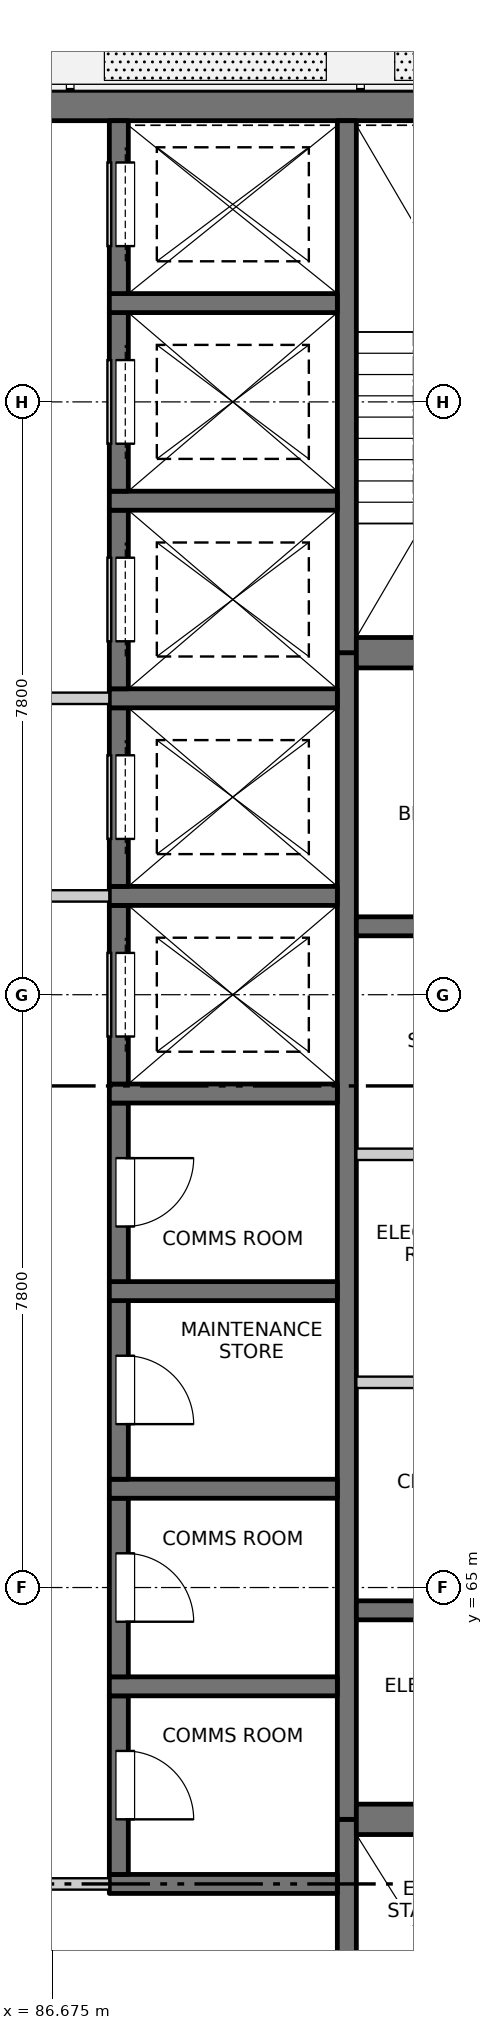
"""IFC4 building model, lengths in metres.
Left out: names, types, materials, properties, quantities, classifications, styles, units other than length and angle.
Written with IfcOpenShell. Run it as: python <this file> out.ifc"""

import sys

from ifc_helpers import new_model, si_unit, direction, frame, frame_2d, origin, place, context, subcontext, project, spatial, rectangle, extrude, element, fill, save


model = new_model("IFC4")
c1 = context("Model", 3, precision=1e-05, world=origin(), true_north=direction((0.0, 1.0)))
c2 = subcontext(c1, "Body", "Model", "MODEL_VIEW")
j1 = project(units=[si_unit("LENGTHUNIT", "METRE"), si_unit("PLANEANGLEUNIT", "RADIAN")], contexts=[c1])
p1 = place(None, origin())
s1 = spatial("IfcSite", under=j1, at=p1, CompositionType="ELEMENT")
p2 = place(p1, origin())
s2 = spatial("IfcBuilding", under=s1, at=p2, CompositionType="ELEMENT")
p3 = place(p2, frame((0.0, 0.0, 246.0)))
s3 = spatial("IfcBuildingStorey", under=s2, at=p3, CompositionType="ELEMENT", Elevation=246.0)
p4 = place(p3, frame((75.45, 84.5, -0.3), z_axis=(0.0, 0.0, 1.0), x_axis=(1.0, 0.0, 0.0)))
e1 = element("IfcWall", 1, at=p4, inside=s3, PredefinedType="SOLIDWALL", context=c2, shape_type="SweptSolid", body=[
    extrude(rectangle(XDim=19.1, YDim=0.4, at=frame_2d((9.55, 0.0))), origin(), (0.0, 0.0, 1.0), 3.45),
])
p5 = place(p3, frame((90.55, 55.45, -0.3), z_axis=(0.0, 0.0, 1.0), x_axis=(0.0, 1.0, 0.0)))
e2 = element("IfcWall", 2, at=p5, inside=s3, PredefinedType="SOLIDWALL", context=c2, shape_type="SweptSolid", body=[
    extrude(rectangle(XDim=6.5, YDim=0.25, at=frame_2d((3.25, 0.0))), origin(), (0.0, 0.0, 1.0), 3.45),
])
p6 = place(p3, frame((90.55, 61.95, -0.3), z_axis=(0.0, 0.0, 1.0), x_axis=(0.0, 1.0, 0.0)))
e3 = element("IfcWall", 3, at=p6, inside=s3, PredefinedType="SOLIDWALL", context=c2, shape_type="SweptSolid", body=[
    extrude(rectangle(XDim=15.35, YDim=0.25, at=frame_2d((7.675, 0.0))), origin(), (0.0, 0.0, 1.0), 3.45),
])
p7 = place(p3, frame((90.55, 77.3, -0.3), z_axis=(0.0, 0.0, 1.0), x_axis=(0.0, 1.0, 0.0)))
e4 = element("IfcWall", 4, at=p7, inside=s3, PredefinedType="SOLIDWALL", context=c2, shape_type="SweptSolid", body=[
    extrude(rectangle(XDim=7.0, YDim=0.25, at=frame_2d((3.5, 0.0))), origin(), (0.0, 0.0, 1.0), 3.45),
])
p8 = place(p3, frame((87.425, 61.1, -0.3), z_axis=(0.0, 0.0, 1.0), x_axis=(1.0, 0.0, 0.0)))
e5 = element("IfcWall", 5, at=p8, inside=s3, PredefinedType="SOLIDWALL", context=c2, shape_type="SweptSolid", body=[
    extrude(rectangle(XDim=3.0, YDim=0.25, at=frame_2d((1.5, 0.0))), origin(), (0.0, 0.0, 1.0), 3.45),
])
p9 = place(p3, frame((87.55, 61.225, -0.3), z_axis=(0.0, 0.0, 1.0), x_axis=(0.0, 1.0, 0.0)))
e6 = element("IfcWall", 6, at=p9, inside=s3, PredefinedType="SOLIDWALL", context=c2, shape_type="SweptSolid", body=[
    extrude(rectangle(XDim=2.35, YDim=0.25, at=frame_2d((1.175, 0.0))), origin(), (0.0, 0.0, 1.0), 3.45),
])
p10 = place(p9, frame((0.725, 0.0, 0.3)))
e7 = element("IfcOpeningElement", 7, at=p10, cuts=e6, PredefinedType="OPENING", context=c2, shape_type="SweptSolid", body=[
    extrude(rectangle(XDim=0.9, YDim=2.1, at=frame_2d((0.45, 1.05))), frame((0.0, 0.135, 0.0), z_axis=(0.0, -1.0, 0.0), x_axis=(1.0, 0.0, 0.0)), (0.0, 0.0, 1.0), 0.27),
])
p11 = place(p3, frame((87.425, 63.7, -0.3), z_axis=(0.0, 0.0, 1.0), x_axis=(1.0, 0.0, 0.0)))
e8 = element("IfcWall", 8, at=p11, inside=s3, PredefinedType="SOLIDWALL", context=c2, shape_type="SweptSolid", body=[
    extrude(rectangle(XDim=3.0, YDim=0.25, at=frame_2d((1.5, 0.0))), origin(), (0.0, 0.0, 1.0), 3.45),
])
p12 = place(p3, frame((87.55, 63.825, -0.3), z_axis=(0.0, 0.0, 1.0), x_axis=(0.0, 1.0, 0.0)))
e9 = element("IfcWall", 9, at=p12, inside=s3, PredefinedType="SOLIDWALL", context=c2, shape_type="SweptSolid", body=[
    extrude(rectangle(XDim=2.35, YDim=0.25, at=frame_2d((1.175, 0.0))), origin(), (0.0, 0.0, 1.0), 3.45),
])
p13 = place(p12, frame((0.725, 0.0, 0.3)))
e10 = element("IfcOpeningElement", 10, at=p13, cuts=e9, PredefinedType="OPENING", context=c2, shape_type="SweptSolid", body=[
    extrude(rectangle(XDim=0.9, YDim=2.1, at=frame_2d((0.45, 1.05))), frame((0.0, 0.135, 0.0), z_axis=(0.0, -1.0, 0.0), x_axis=(1.0, 0.0, 0.0)), (0.0, 0.0, 1.0), 0.27),
])
p14 = place(p3, frame((87.425, 66.3, -0.3), z_axis=(0.0, 0.0, 1.0), x_axis=(1.0, 0.0, 0.0)))
e11 = element("IfcWall", 11, at=p14, inside=s3, PredefinedType="SOLIDWALL", context=c2, shape_type="SweptSolid", body=[
    extrude(rectangle(XDim=3.0, YDim=0.25, at=frame_2d((1.5, 0.0))), origin(), (0.0, 0.0, 1.0), 3.45),
])
p15 = place(p3, frame((87.55, 66.425, -0.3), z_axis=(0.0, 0.0, 1.0), x_axis=(0.0, 1.0, 0.0)))
e12 = element("IfcWall", 12, at=p15, inside=s3, PredefinedType="SOLIDWALL", context=c2, shape_type="SweptSolid", body=[
    extrude(rectangle(XDim=2.35, YDim=0.25, at=frame_2d((1.175, 0.0))), origin(), (0.0, 0.0, 1.0), 3.45),
])
p16 = place(p15, frame((0.725, 0.0, 0.3)))
e13 = element("IfcOpeningElement", 13, at=p16, cuts=e12, PredefinedType="OPENING", context=c2, shape_type="SweptSolid", body=[
    extrude(rectangle(XDim=0.9, YDim=2.1, at=frame_2d((0.45, 1.05))), frame((0.0, 0.135, 0.0), z_axis=(0.0, -1.0, 0.0), x_axis=(1.0, 0.0, 0.0)), (0.0, 0.0, 1.0), 0.27),
])
p17 = place(p3, frame((87.425, 68.9, -0.3), z_axis=(0.0, 0.0, 1.0), x_axis=(1.0, 0.0, 0.0)))
e14 = element("IfcWall", 14, at=p17, inside=s3, PredefinedType="SOLIDWALL", context=c2, shape_type="SweptSolid", body=[
    extrude(rectangle(XDim=3.0, YDim=0.25, at=frame_2d((1.5, 0.0))), origin(), (0.0, 0.0, 1.0), 3.45),
])
p18 = place(p3, frame((87.55, 69.025, -0.3), z_axis=(0.0, 0.0, 1.0), x_axis=(0.0, 1.0, 0.0)))
e15 = element("IfcWall", 15, at=p18, inside=s3, PredefinedType="SOLIDWALL", context=c2, shape_type="SweptSolid", body=[
    extrude(rectangle(XDim=2.35, YDim=0.25, at=frame_2d((1.175, 0.0))), origin(), (0.0, 0.0, 1.0), 3.45),
])
p19 = place(p18, frame((0.725, 0.0, 0.3)))
e16 = element("IfcOpeningElement", 16, at=p19, cuts=e15, PredefinedType="OPENING", context=c2, shape_type="SweptSolid", body=[
    extrude(rectangle(XDim=0.9, YDim=2.1, at=frame_2d((0.45, 1.05))), frame((0.0, 0.135, 0.0), z_axis=(0.0, -1.0, 0.0), x_axis=(1.0, 0.0, 0.0)), (0.0, 0.0, 1.0), 0.27),
])
p20 = place(p3, frame((87.425, 71.5, -0.3), z_axis=(0.0, 0.0, 1.0), x_axis=(1.0, 0.0, 0.0)))
e17 = element("IfcWall", 17, at=p20, inside=s3, PredefinedType="SOLIDWALL", context=c2, shape_type="SweptSolid", body=[
    extrude(rectangle(XDim=3.0, YDim=0.25, at=frame_2d((1.5, 0.0))), origin(), (0.0, 0.0, 1.0), 3.45),
])
p21 = place(p3, frame((87.55, 71.625, -0.3), z_axis=(0.0, 0.0, 1.0), x_axis=(0.0, 1.0, 0.0)))
e18 = element("IfcWall", 18, at=p21, inside=s3, PredefinedType="SOLIDWALL", context=c2, shape_type="SweptSolid", body=[
    extrude(rectangle(XDim=2.35, YDim=0.25, at=frame_2d((1.175, 0.0))), origin(), (0.0, 0.0, 1.0), 3.45),
])
p22 = place(p21, frame((0.625, 0.0, 0.3)))
e19 = element("IfcOpeningElement", 19, at=p22, cuts=e18, PredefinedType="OPENING", context=c2, shape_type="SweptSolid", body=[
    extrude(rectangle(XDim=1.1, YDim=2.1, at=frame_2d((0.55, 1.05))), frame((0.0, 0.135, 0.0), z_axis=(0.0, -1.0, 0.0), x_axis=(1.0, 0.0, 0.0)), (0.0, 0.0, 1.0), 0.27),
])
p23 = place(p3, frame((87.425, 74.1, -0.3), z_axis=(0.0, 0.0, 1.0), x_axis=(1.0, 0.0, 0.0)))
e20 = element("IfcWall", 20, at=p23, inside=s3, PredefinedType="SOLIDWALL", context=c2, shape_type="SweptSolid", body=[
    extrude(rectangle(XDim=3.0, YDim=0.25, at=frame_2d((1.5, 0.0))), origin(), (0.0, 0.0, 1.0), 3.45),
])
p24 = place(p3, frame((87.55, 74.225, -0.3), z_axis=(0.0, 0.0, 1.0), x_axis=(0.0, 1.0, 0.0)))
e21 = element("IfcWall", 21, at=p24, inside=s3, PredefinedType="SOLIDWALL", context=c2, shape_type="SweptSolid", body=[
    extrude(rectangle(XDim=2.35, YDim=0.25, at=frame_2d((1.175, 0.0))), origin(), (0.0, 0.0, 1.0), 3.45),
])
p25 = place(p24, frame((0.625, 0.0, 0.3)))
e22 = element("IfcOpeningElement", 22, at=p25, cuts=e21, PredefinedType="OPENING", context=c2, shape_type="SweptSolid", body=[
    extrude(rectangle(XDim=1.1, YDim=2.1, at=frame_2d((0.55, 1.05))), frame((0.0, 0.135, 0.0), z_axis=(0.0, -1.0, 0.0), x_axis=(1.0, 0.0, 0.0)), (0.0, 0.0, 1.0), 0.27),
])
p26 = place(p3, frame((87.425, 76.7, -0.3), z_axis=(0.0, 0.0, 1.0), x_axis=(1.0, 0.0, 0.0)))
e23 = element("IfcWall", 23, at=p26, inside=s3, PredefinedType="SOLIDWALL", context=c2, shape_type="SweptSolid", body=[
    extrude(rectangle(XDim=3.0, YDim=0.25, at=frame_2d((1.5, 0.0))), origin(), (0.0, 0.0, 1.0), 3.45),
])
p27 = place(p3, frame((87.55, 76.825, -0.3), z_axis=(0.0, 0.0, 1.0), x_axis=(0.0, 1.0, 0.0)))
e24 = element("IfcWall", 24, at=p27, inside=s3, PredefinedType="SOLIDWALL", context=c2, shape_type="SweptSolid", body=[
    extrude(rectangle(XDim=2.35, YDim=0.25, at=frame_2d((1.175, 0.0))), origin(), (0.0, 0.0, 1.0), 3.45),
])
p28 = place(p27, frame((0.625, 0.0, 0.3)))
e25 = element("IfcOpeningElement", 25, at=p28, cuts=e24, PredefinedType="OPENING", context=c2, shape_type="SweptSolid", body=[
    extrude(rectangle(XDim=1.1, YDim=2.1, at=frame_2d((0.55, 1.05))), frame((0.0, 0.135, 0.0), z_axis=(0.0, -1.0, 0.0), x_axis=(1.0, 0.0, 0.0)), (0.0, 0.0, 1.0), 0.27),
])
p29 = place(p3, frame((87.425, 79.3, -0.3), z_axis=(0.0, 0.0, 1.0), x_axis=(1.0, 0.0, 0.0)))
e26 = element("IfcWall", 26, at=p29, inside=s3, PredefinedType="SOLIDWALL", context=c2, shape_type="SweptSolid", body=[
    extrude(rectangle(XDim=3.0, YDim=0.25, at=frame_2d((1.5, 0.0))), origin(), (0.0, 0.0, 1.0), 3.45),
])
p30 = place(p3, frame((87.55, 79.425, -0.3), z_axis=(0.0, 0.0, 1.0), x_axis=(0.0, 1.0, 0.0)))
e27 = element("IfcWall", 27, at=p30, inside=s3, PredefinedType="SOLIDWALL", context=c2, shape_type="SweptSolid", body=[
    extrude(rectangle(XDim=2.35, YDim=0.25, at=frame_2d((1.175, 0.0))), origin(), (0.0, 0.0, 1.0), 3.45),
])
p31 = place(p30, frame((0.625, 0.0, 0.3)))
e28 = element("IfcOpeningElement", 28, at=p31, cuts=e27, PredefinedType="OPENING", context=c2, shape_type="SweptSolid", body=[
    extrude(rectangle(XDim=1.1, YDim=2.1, at=frame_2d((0.55, 1.05))), frame((0.0, 0.135, 0.0), z_axis=(0.0, -1.0, 0.0), x_axis=(1.0, 0.0, 0.0)), (0.0, 0.0, 1.0), 0.27),
])
p32 = place(p3, frame((87.425, 81.9, -0.3), z_axis=(0.0, 0.0, 1.0), x_axis=(1.0, 0.0, 0.0)))
e29 = element("IfcWall", 29, at=p32, inside=s3, PredefinedType="SOLIDWALL", context=c2, shape_type="SweptSolid", body=[
    extrude(rectangle(XDim=3.0, YDim=0.25, at=frame_2d((1.5, 0.0))), origin(), (0.0, 0.0, 1.0), 3.45),
])
p33 = place(p3, frame((87.55, 82.025, -0.3), z_axis=(0.0, 0.0, 1.0), x_axis=(0.0, 1.0, 0.0)))
e30 = element("IfcWall", 30, at=p33, inside=s3, PredefinedType="SOLIDWALL", context=c2, shape_type="SweptSolid", body=[
    extrude(rectangle(XDim=2.275, YDim=0.25, at=frame_2d((1.138, 0.0))), origin(), (0.0, 0.0, 1.0), 3.45),
])
p34 = place(p33, frame((0.625, 0.0, 0.3)))
e31 = element("IfcOpeningElement", 31, at=p34, cuts=e30, PredefinedType="OPENING", context=c2, shape_type="SweptSolid", body=[
    extrude(rectangle(XDim=1.1, YDim=2.1, at=frame_2d((0.55, 1.05))), frame((0.0, 0.135, 0.0), z_axis=(0.0, -1.0, 0.0), x_axis=(1.0, 0.0, 0.0)), (0.0, 0.0, 1.0), 0.27),
])
p35 = place(p3, frame((90.675, 61.95, -0.3), z_axis=(0.0, 0.0, 1.0), x_axis=(1.0, 0.0, 0.0)))
e32 = element("IfcWall", 32, at=p35, inside=s3, PredefinedType="SOLIDWALL", context=c2, shape_type="SweptSolid", body=[
    extrude(rectangle(XDim=3.875, YDim=0.4, at=frame_2d((1.938, 0.0))), origin(), (0.0, 0.0, 1.0), 3.45),
])
for number, where, z_axis, x_axis in (
    (33, (90.675, 64.7, -0.3), (0.0, 0.0, 1.0), (1.0, 0.0, 0.0)),
    (34, (90.675, 73.7, -0.3), (0.0, 0.0, 1.0), (1.0, 0.0, 0.0)),
):
    element("IfcWall", number, at=place(p3, frame(where, z_axis=z_axis, x_axis=x_axis)), inside=s3, PredefinedType="SOLIDWALL", context=c2, shape_type="SweptSolid", body=[
        extrude(rectangle(XDim=3.875, YDim=0.25, at=frame_2d((1.938, 0.0))), origin(), (0.0, 0.0, 1.0), 3.45),
    ])
p36 = place(p3, frame((90.675, 77.3, -0.3), z_axis=(0.0, 0.0, 1.0), x_axis=(1.0, 0.0, 0.0)))
e35 = element("IfcWall", 35, at=p36, inside=s3, PredefinedType="SOLIDWALL", context=c2, shape_type="SweptSolid", body=[
    extrude(rectangle(XDim=3.875, YDim=0.4, at=frame_2d((1.938, 0.0))), origin(), (0.0, 0.0, 1.0), 3.45),
])
p37 = place(p3, frame((82.575, 61.1, 0.0), z_axis=(0.0, 0.0, 1.0), x_axis=(1.0, 0.0, 0.0)))
e36 = element("IfcWall", 36, at=p37, inside=s3, PredefinedType="PARTITIONING", context=c2, shape_type="SweptSolid", body=[
    extrude(rectangle(XDim=4.85, YDim=0.15, at=frame_2d((2.425, 0.0))), origin(), (0.0, 0.0, 1.0), 3.15),
])
p38 = place(p37, frame((1.525, 0.0, 0.0)))
e37 = element("IfcOpeningElement", 37, at=p38, cuts=e36, PredefinedType="OPENING", context=c2, shape_type="SweptSolid", body=[
    extrude(rectangle(XDim=1.8, YDim=2.1, at=frame_2d((0.9, 1.05))), frame((0.0, 0.085, 0.0), z_axis=(0.0, -1.0, 0.0), x_axis=(1.0, 0.0, 0.0)), (0.0, 0.0, 1.0), 0.17),
])
for number, where, z_axis, x_axis in (
    (38, (90.675, 67.7, 0.0), (0.0, 0.0, 1.0), (1.0, 0.0, 0.0)),
    (39, (90.675, 70.7, 0.0), (0.0, 0.0, 1.0), (1.0, 0.0, 0.0)),
):
    element("IfcWall", number, at=place(p3, frame(where, z_axis=z_axis, x_axis=x_axis)), inside=s3, PredefinedType="PARTITIONING", context=c2, shape_type="SweptSolid", body=[
        extrude(rectangle(XDim=3.875, YDim=0.15, at=frame_2d((1.938, 0.0))), origin(), (0.0, 0.0, 1.0), 3.15),
    ])
p39 = place(p3, frame((82.575, 74.1, 0.0), z_axis=(0.0, 0.0, 1.0), x_axis=(1.0, 0.0, 0.0)))
e40 = element("IfcWall", 40, at=p39, inside=s3, PredefinedType="PARTITIONING", context=c2, shape_type="SweptSolid", body=[
    extrude(rectangle(XDim=4.85, YDim=0.15, at=frame_2d((2.425, 0.0))), origin(), (0.0, 0.0, 1.0), 3.15),
])
p40 = place(p39, frame((1.525, 0.0, 0.0)))
e41 = element("IfcOpeningElement", 41, at=p40, cuts=e40, PredefinedType="OPENING", context=c2, shape_type="SweptSolid", body=[
    extrude(rectangle(XDim=1.8, YDim=2.1, at=frame_2d((0.9, 1.05))), frame((0.0, 0.085, 0.0), z_axis=(0.0, -1.0, 0.0), x_axis=(1.0, 0.0, 0.0)), (0.0, 0.0, 1.0), 0.17),
])
p41 = place(p3, frame((82.575, 76.7, 0.0), z_axis=(0.0, 0.0, 1.0), x_axis=(1.0, 0.0, 0.0)))
e42 = element("IfcWall", 42, at=p41, inside=s3, PredefinedType="PARTITIONING", context=c2, shape_type="SweptSolid", body=[
    extrude(rectangle(XDim=4.85, YDim=0.15, at=frame_2d((2.425, 0.0))), origin(), (0.0, 0.0, 1.0), 3.15),
])
p42 = place(p41, frame((1.525, 0.0, 0.0)))
e43 = element("IfcOpeningElement", 43, at=p42, cuts=e42, PredefinedType="OPENING", context=c2, shape_type="SweptSolid", body=[
    extrude(rectangle(XDim=1.8, YDim=2.1, at=frame_2d((0.9, 1.05))), frame((0.0, 0.085, 0.0), z_axis=(0.0, -1.0, 0.0), x_axis=(1.0, 0.0, 0.0)), (0.0, 0.0, 1.0), 0.17),
])
p43 = place(p10, origin())
e44 = element("IfcDoor", 44, at=p43, inside=s3, OperationType="SINGLE_SWING_RIGHT", PredefinedType="DOOR", context=c2, shape_type="SweptSolid", body=[
    extrude(rectangle(XDim=0.9, YDim=2.1, at=frame_2d((0.45, 1.05))), frame((0.0, -0.06, 0.0), z_axis=(0.0, -1.0, 0.0), x_axis=(1.0, 0.0, 0.0)), (0.0, 0.0, 1.0), 0.05),
])
fill(e7, e44)
p44 = place(p13, origin())
e45 = element("IfcDoor", 45, at=p44, inside=s3, OperationType="SINGLE_SWING_RIGHT", PredefinedType="DOOR", context=c2, shape_type="SweptSolid", body=[
    extrude(rectangle(XDim=0.9, YDim=2.1, at=frame_2d((0.45, 1.05))), frame((0.0, -0.06, 0.0), z_axis=(0.0, -1.0, 0.0), x_axis=(1.0, 0.0, 0.0)), (0.0, 0.0, 1.0), 0.05),
])
fill(e10, e45)
p45 = place(p16, origin())
e46 = element("IfcDoor", 46, at=p45, inside=s3, OperationType="SINGLE_SWING_RIGHT", PredefinedType="DOOR", context=c2, shape_type="SweptSolid", body=[
    extrude(rectangle(XDim=0.9, YDim=2.1, at=frame_2d((0.45, 1.05))), frame((0.0, -0.06, 0.0), z_axis=(0.0, -1.0, 0.0), x_axis=(1.0, 0.0, 0.0)), (0.0, 0.0, 1.0), 0.05),
])
fill(e13, e46)
p46 = place(p19, origin())
e47 = element("IfcDoor", 47, at=p46, inside=s3, OperationType="SINGLE_SWING_LEFT", PredefinedType="DOOR", context=c2, shape_type="SweptSolid", body=[
    extrude(rectangle(XDim=0.9, YDim=2.1, at=frame_2d((0.45, 1.05))), frame((0.0, -0.06, 0.0), z_axis=(0.0, -1.0, 0.0), x_axis=(1.0, 0.0, 0.0)), (0.0, 0.0, 1.0), 0.05),
])
fill(e16, e47)
p47 = place(p22, origin())
e48 = element("IfcDoor", 48, at=p47, inside=s3, OperationType="SLIDING_TO_LEFT", PredefinedType="DOOR", context=c2, shape_type="SweptSolid", body=[
    extrude(rectangle(XDim=1.1, YDim=2.1, at=frame_2d((0.55, 1.05))), frame((0.0, -0.06, 0.0), z_axis=(0.0, -1.0, 0.0), x_axis=(1.0, 0.0, 0.0)), (0.0, 0.0, 1.0), 0.05),
])
fill(e19, e48)
p48 = place(p25, origin())
e49 = element("IfcDoor", 49, at=p48, inside=s3, OperationType="SLIDING_TO_LEFT", PredefinedType="DOOR", context=c2, shape_type="SweptSolid", body=[
    extrude(rectangle(XDim=1.1, YDim=2.1, at=frame_2d((0.55, 1.05))), frame((0.0, -0.06, 0.0), z_axis=(0.0, -1.0, 0.0), x_axis=(1.0, 0.0, 0.0)), (0.0, 0.0, 1.0), 0.05),
])
fill(e22, e49)
p49 = place(p28, origin())
e50 = element("IfcDoor", 50, at=p49, inside=s3, OperationType="SLIDING_TO_LEFT", PredefinedType="DOOR", context=c2, shape_type="SweptSolid", body=[
    extrude(rectangle(XDim=1.1, YDim=2.1, at=frame_2d((0.55, 1.05))), frame((0.0, -0.06, 0.0), z_axis=(0.0, -1.0, 0.0), x_axis=(1.0, 0.0, 0.0)), (0.0, 0.0, 1.0), 0.05),
])
fill(e25, e50)
p50 = place(p31, origin())
e51 = element("IfcDoor", 51, at=p50, inside=s3, OperationType="SLIDING_TO_RIGHT", PredefinedType="DOOR", context=c2, shape_type="SweptSolid", body=[
    extrude(rectangle(XDim=1.1, YDim=2.1, at=frame_2d((0.55, 1.05))), frame((0.0, -0.06, 0.0), z_axis=(0.0, -1.0, 0.0), x_axis=(1.0, 0.0, 0.0)), (0.0, 0.0, 1.0), 0.05),
])
fill(e28, e51)
p51 = place(p34, origin())
e52 = element("IfcDoor", 52, at=p51, inside=s3, OperationType="SLIDING_TO_RIGHT", PredefinedType="DOOR", context=c2, shape_type="SweptSolid", body=[
    extrude(rectangle(XDim=1.1, YDim=2.1, at=frame_2d((0.55, 1.05))), frame((0.0, -0.06, 0.0), z_axis=(0.0, -1.0, 0.0), x_axis=(1.0, 0.0, 0.0)), (0.0, 0.0, 1.0), 0.05),
])
fill(e31, e52)
save(model, sys.argv[1])
